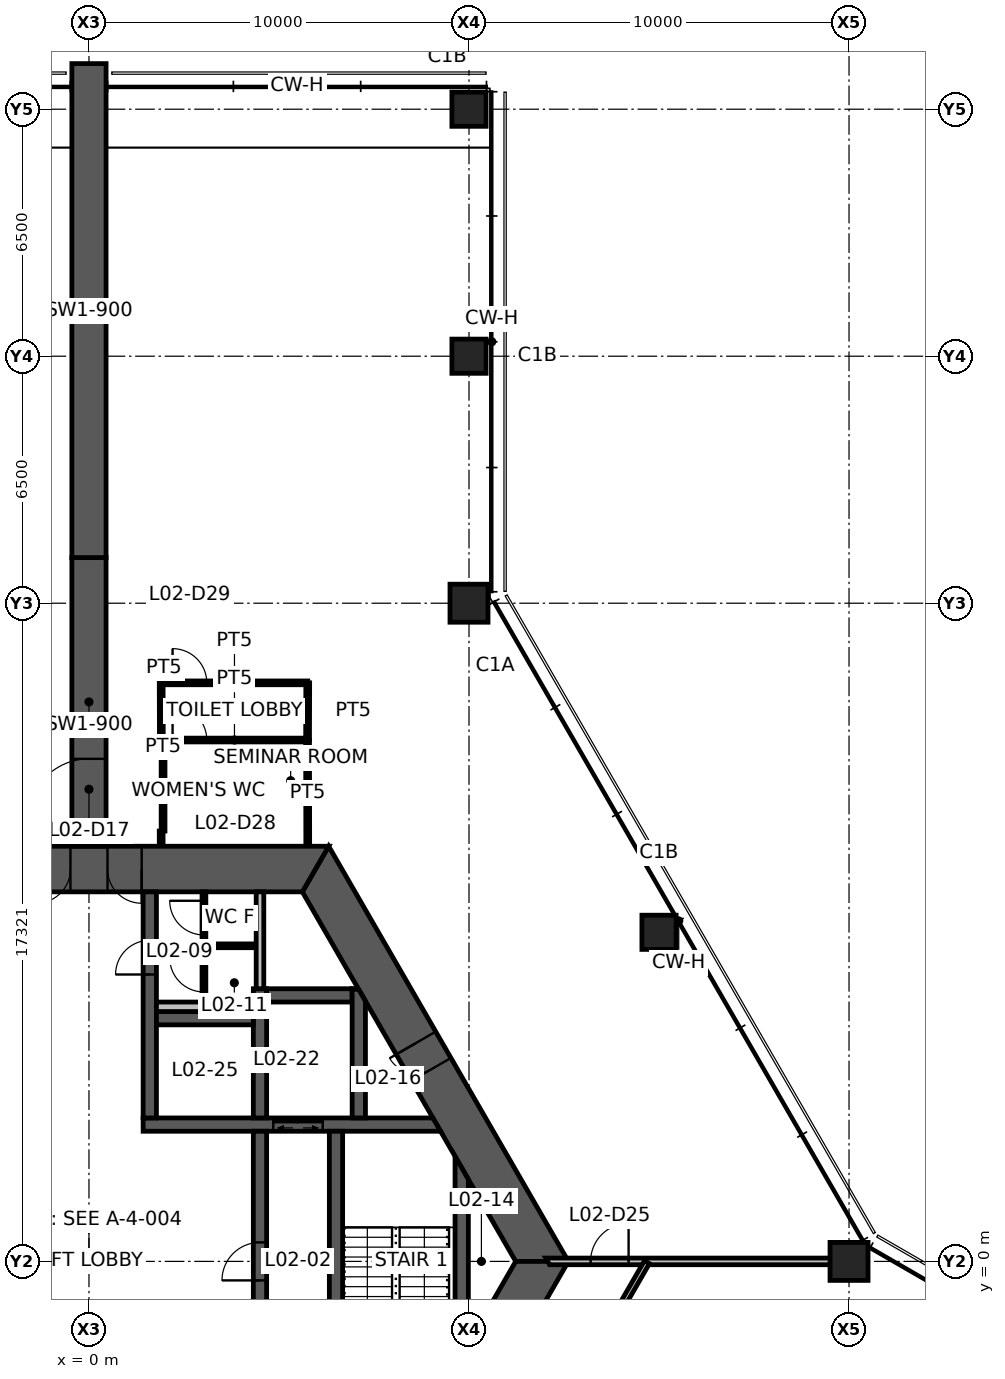
"""IFC4 building model, lengths in metres.
Left out: names, types, materials, properties, quantities, classifications, styles, units other than length and angle.
Written with IfcOpenShell. Run it as: python <this file> out.ifc"""

import sys

from ifc_helpers import new_model, si_unit, direction, frame, frame_2d, origin, origin_2d, place, context, subcontext, project, spatial, polyline, rectangle, hollow_rectangle, outline, extrude, element, fill, save


model = new_model("IFC4")
c1 = context("Model", 3, precision=1e-05, world=origin(), true_north=direction((0.0, 1.0)))
c2 = subcontext(c1, "Body", "Model", "MODEL_VIEW")
j1 = project(units=[si_unit("LENGTHUNIT", "METRE"), si_unit("PLANEANGLEUNIT", "RADIAN")], contexts=[c1])
p1 = place(None, origin())
s1 = spatial("IfcSite", under=j1, at=p1, CompositionType="ELEMENT")
p2 = place(p1, origin())
s2 = spatial("IfcBuilding", under=s1, at=p2, CompositionType="ELEMENT")
p3 = place(p2, frame((0.0, 0.0, 5.5)))
s3 = spatial("IfcBuildingStorey", under=s2, at=p3, CompositionType="ELEMENT", Elevation=5.5)
for number, where, z_axis, x_axis in (
    (1, (20.0, 0.0, 0.0), (0.0, 0.0, 1.0), (1.0, 0.0, 0.0)),
    (2, (10.0, 17.321, 0.0), (0.0, 0.0, 1.0), (1.0, 0.0, 0.0)),
):
    element("IfcColumn", number, at=place(p3, frame(where, z_axis=z_axis, x_axis=x_axis)), inside=s3, PredefinedType="COLUMN", context=c2, shape_type="SweptSolid", body=[
        extrude(hollow_rectangle(XDim=1.0, YDim=1.0, WallThickness=0.06, at=origin_2d()), origin(), (0.0, 0.0, 1.0), 4.5),
    ])
for number, where, z_axis, x_axis in (
    (3, (15.0, 8.66, 0.0), (0.0, 0.0, 1.0), (1.0, 0.0, 0.0)),
    (4, (10.0, 23.821, 0.0), (0.0, 0.0, 1.0), (1.0, 0.0, 0.0)),
    (5, (10.0, 30.321, 0.0), (0.0, 0.0, 1.0), (1.0, 0.0, 0.0)),
):
    element("IfcColumn", number, at=place(p3, frame(where, z_axis=z_axis, x_axis=x_axis)), inside=s3, PredefinedType="COLUMN", context=c2, shape_type="SweptSolid", body=[
        extrude(hollow_rectangle(XDim=0.9, YDim=0.9, WallThickness=0.05, at=origin_2d()), origin(), (0.0, 0.0, 1.0), 4.5),
    ])
p4 = place(p3, frame((11.922, 0.0, 0.0), z_axis=(0.0, 0.0, 1.0), x_axis=(-0.500004296715, 0.866022923061, 0.0)))
e6 = element("IfcWall", 6, at=p4, inside=s3, PredefinedType="SHEAR", context=c2, shape_type="SweptSolid", body=[
    extrude(outline(polyline([(-0.346, -0.6), (5.835, -0.6), (6.635, -0.6), (12.269, -0.6), (11.576, 0.6), (6.635, 0.6), (5.835, 0.6), (0.346, 0.6), (-0.346, -0.6)])), origin(), (0.0, 0.0, 1.0), 4.5),
])
p5 = place(p4, frame((5.835, 0.0, 0.0)))
e7 = element("IfcOpeningElement", 7, at=p5, cuts=e6, PredefinedType="OPENING", context=c2, shape_type="SweptSolid", body=[
    extrude(rectangle(XDim=0.8, YDim=2.1, at=frame_2d((0.4, 1.05))), frame((0.0, 0.61, 0.0), z_axis=(0.0, -1.0, 0.0), x_axis=(1.0, 0.0, 0.0)), (0.0, 0.0, 1.0), 1.22),
])
p6 = place(p3, frame((5.961, 10.325, 0.0), z_axis=(0.0, 0.0, 1.0), x_axis=(-1.0, 0.0, 0.0)))
e8 = element("IfcWall", 8, at=p6, inside=s3, PredefinedType="SHEAR", context=c2, shape_type="SweptSolid", body=[
    extrude(outline(polyline([(-0.346, -0.6), (4.574, -0.6), (5.474, -0.6), (6.449, -0.6), (7.349, -0.6), (12.269, -0.6), (11.576, 0.6), (7.349, 0.6), (6.449, 0.6), (5.474, 0.6), (4.574, 0.6), (0.346, 0.6), (-0.346, -0.6)])), origin(), (0.0, 0.0, 1.0), 4.5),
])
p7 = place(p6, frame((6.449, 0.0, 0.0)))
e9 = element("IfcOpeningElement", 9, at=p7, cuts=e8, PredefinedType="OPENING", context=c2, shape_type="SweptSolid", body=[
    extrude(rectangle(XDim=0.9, YDim=2.1, at=frame_2d((0.45, 1.05))), frame((0.0, 0.61, 0.0), z_axis=(0.0, -1.0, 0.0), x_axis=(1.0, 0.0, 0.0)), (0.0, 0.0, 1.0), 1.22),
])
p8 = place(p6, frame((4.574, 0.0, 0.0)))
e10 = element("IfcOpeningElement", 10, at=p8, cuts=e8, PredefinedType="OPENING", context=c2, shape_type="SweptSolid", body=[
    extrude(rectangle(XDim=0.9, YDim=2.1, at=frame_2d((0.45, 1.05))), frame((0.0, 0.61, 0.0), z_axis=(0.0, -1.0, 0.0), x_axis=(1.0, 0.0, 0.0)), (0.0, 0.0, 1.0), 1.22),
])
p9 = place(p3, frame((5.961, -10.325, 0.0), z_axis=(0.0, 0.0, 1.0), x_axis=(0.500004296715, 0.866022923061, 0.0)))
e11 = element("IfcWall", 11, at=p9, inside=s3, PredefinedType="SHEAR", context=c2, shape_type="SweptSolid", body=[
    extrude(outline(polyline([(-0.346, -0.6), (3.208, -0.6), (4.009, -0.6), (12.269, -0.6), (11.576, 0.6), (4.009, 0.6), (3.208, 0.6), (0.346, 0.6), (-0.346, -0.6)])), origin(), (0.0, 0.0, 1.0), 4.5),
])
p10 = place(p9, frame((3.208, 0.0, 0.0)))
e12 = element("IfcOpeningElement", 12, at=p10, cuts=e11, PredefinedType="OPENING", context=c2, shape_type="SweptSolid", body=[
    extrude(rectangle(XDim=0.8, YDim=2.1, at=frame_2d((0.4, 1.05))), frame((0.0, 0.61, 0.0), z_axis=(0.0, -1.0, 0.0), x_axis=(1.0, 0.0, 0.0)), (0.0, 0.0, 1.0), 1.22),
])
p11 = place(p3, frame((0.0, 10.925, 0.0), z_axis=(0.0, 0.0, 1.0), x_axis=(0.0, 1.0, 0.0)))
e13 = element("IfcWall", 13, at=p11, inside=s3, PredefinedType="SHEAR", context=c2, shape_type="SweptSolid", body=[
    extrude(rectangle(XDim=7.595, YDim=0.9, at=frame_2d((3.798, 0.0))), origin(), (0.0, 0.0, 1.0), 4.5),
])
p12 = place(p11, frame((0.7, 0.0, 0.0)))
e14 = element("IfcOpeningElement", 14, at=p12, cuts=e13, PredefinedType="OPENING", context=c2, shape_type="SweptSolid", body=[
    extrude(rectangle(XDim=1.6, YDim=2.1, at=frame_2d((0.8, 1.05))), frame((0.0, 0.46, 0.0), z_axis=(0.0, -1.0, 0.0), x_axis=(1.0, 0.0, 0.0)), (0.0, 0.0, 1.0), 0.92),
])
p13 = place(p3, frame((0.0, 18.521, 0.0), z_axis=(0.0, 0.0, 1.0), x_axis=(0.0, 1.0, 0.0)))
e15 = element("IfcWall", 15, at=p13, inside=s3, PredefinedType="SHEAR", context=c2, shape_type="SweptSolid", body=[
    extrude(rectangle(XDim=13.0, YDim=0.9, at=frame_2d((6.5, 0.0))), origin(), (0.0, 0.0, 1.0), 4.5),
])
p14 = place(p3, frame((1.425, 3.6, 0.0), z_axis=(0.0, 0.0, 1.0), x_axis=(1.0, 0.0, 0.0)))
e16 = element("IfcWall", 16, at=p14, inside=s3, PredefinedType="SHEAR", context=c2, shape_type="SweptSolid", body=[
    extrude(outline(polyline([(0.0, -0.175), (3.425, -0.175), (4.725, -0.175), (7.827, -0.175), (7.625, 0.175), (4.725, 0.175), (3.425, 0.175), (0.0, 0.175), (0.0, -0.175)])), origin(), (0.0, 0.0, 1.0), 4.5),
])
p15 = place(p14, frame((3.425, 0.0, 0.0)))
e17 = element("IfcOpeningElement", 17, at=p15, cuts=e16, PredefinedType="OPENING", context=c2, shape_type="SweptSolid", body=[
    extrude(rectangle(XDim=1.3, YDim=2.1, at=frame_2d((0.65, 1.05))), frame((0.0, 0.185, 0.0), z_axis=(0.0, -1.0, 0.0), x_axis=(1.0, 0.0, 0.0)), (0.0, 0.0, 1.0), 0.37),
])
p16 = place(p3, frame((1.6, 3.775, 0.0), z_axis=(0.0, 0.0, 1.0), x_axis=(0.0, 1.0, 0.0)))
e18 = element("IfcWall", 18, at=p16, inside=s3, PredefinedType="SHEAR", context=c2, shape_type="SweptSolid", body=[
    extrude(rectangle(XDim=5.95, YDim=0.35, at=frame_2d((2.975, 0.0))), origin(), (0.0, 0.0, 1.0), 4.5),
])
p17 = place(p16, frame((3.775, 0.0, 0.0)))
e19 = element("IfcOpeningElement", 19, at=p17, cuts=e18, PredefinedType="OPENING", context=c2, shape_type="SweptSolid", body=[
    extrude(rectangle(XDim=0.9, YDim=2.1, at=frame_2d((0.45, 1.05))), frame((0.0, 0.185, 0.0), z_axis=(0.0, -1.0, 0.0), x_axis=(1.0, 0.0, 0.0)), (0.0, 0.0, 1.0), 0.37),
])
p18 = place(p3, frame((4.5, -3.425, 0.0), z_axis=(0.0, 0.0, 1.0), x_axis=(0.0, 1.0, 0.0)))
e20 = element("IfcWall", 20, at=p18, inside=s3, PredefinedType="SHEAR", context=c2, shape_type="SweptSolid", body=[
    extrude(rectangle(XDim=6.85, YDim=0.35, at=frame_2d((3.425, 0.0))), origin(), (0.0, 0.0, 1.0), 4.5),
])
p19 = place(p18, frame((2.925, 0.0, 0.0)))
e21 = element("IfcOpeningElement", 21, at=p19, cuts=e20, PredefinedType="OPENING", context=c2, shape_type="SweptSolid", body=[
    extrude(rectangle(XDim=1.0, YDim=2.1, at=frame_2d((0.5, 1.05))), frame((0.0, 0.185, 0.0), z_axis=(0.0, -1.0, 0.0), x_axis=(1.0, 0.0, 0.0)), (0.0, 0.0, 1.0), 0.37),
])
p20 = place(p3, frame((6.5, -3.425, 0.0), z_axis=(0.0, 0.0, 1.0), x_axis=(0.0, 1.0, 0.0)))
e22 = element("IfcWall", 22, at=p20, inside=s3, PredefinedType="SHEAR", context=c2, shape_type="SweptSolid", body=[
    extrude(rectangle(XDim=6.85, YDim=0.35, at=frame_2d((3.425, 0.0))), origin(), (0.0, 0.0, 1.0), 4.5),
])
p21 = place(p20, frame((0.1, 0.0, 0.0)))
e23 = element("IfcOpeningElement", 23, at=p21, cuts=e22, PredefinedType="OPENING", context=c2, shape_type="SweptSolid", body=[
    extrude(rectangle(XDim=1.0, YDim=2.1, at=frame_2d((0.5, 1.05))), frame((0.0, 0.185, 0.0), z_axis=(0.0, -1.0, 0.0), x_axis=(1.0, 0.0, 0.0)), (0.0, 0.0, 1.0), 0.37),
])
p22 = place(p3, frame((4.5, 3.775, 0.0), z_axis=(0.0, 0.0, 1.0), x_axis=(0.0, 1.0, 0.0)))
e24 = element("IfcWall", 24, at=p22, inside=s3, PredefinedType="SHEAR", context=c2, shape_type="SweptSolid", body=[
    extrude(rectangle(XDim=3.4, YDim=0.35, at=frame_2d((1.7, 0.0))), origin(), (0.0, 0.0, 1.0), 4.5),
])
p23 = place(p3, frame((1.775, 6.4, 0.0), z_axis=(0.0, 0.0, 1.0), x_axis=(1.0, 0.0, 0.0)))
e25 = element("IfcWall", 25, at=p23, inside=s3, PredefinedType="SHEAR", context=c2, shape_type="SweptSolid", body=[
    extrude(rectangle(XDim=2.55, YDim=0.35, at=frame_2d((1.275, 0.0))), origin(), (0.0, 0.0, 1.0), 4.5),
])
p24 = place(p3, frame((4.675, 7.0, 0.0), z_axis=(0.0, 0.0, 1.0), x_axis=(1.0, 0.0, 0.0)))
e26 = element("IfcWall", 26, at=p24, inside=s3, PredefinedType="SHEAR", context=c2, shape_type="SweptSolid", body=[
    extrude(rectangle(XDim=2.25, YDim=0.35, at=frame_2d((1.125, 0.0))), origin(), (0.0, 0.0, 1.0), 4.5),
])
p25 = place(p3, frame((7.1, 3.775, 0.0), z_axis=(0.0, 0.0, 1.0), x_axis=(0.0, 1.0, 0.0)))
e27 = element("IfcWall", 27, at=p25, inside=s3, PredefinedType="SHEAR", context=c2, shape_type="SweptSolid", body=[
    extrude(outline(polyline([(0.0, -0.175), (3.074, -0.175), (3.377, 0.0), (3.4, 0.175), (0.0, 0.175), (0.0, -0.175)])), origin(), (0.0, 0.0, 1.0), 4.5),
])
p26 = place(p3, frame((9.808, -2.462, 0.0), z_axis=(0.0, 0.0, 1.0), x_axis=(0.0, 1.0, 0.0)))
e28 = element("IfcWall", 28, at=p26, inside=s3, PredefinedType="SHEAR", context=c2, shape_type="SweptSolid", body=[
    extrude(outline(polyline([(0.303, -0.175), (4.621, -0.175), (5.228, 0.175), (-0.303, 0.175), (0.303, -0.175)])), origin(), (0.0, 0.0, 1.0), 4.5),
])
p27 = place(p3, frame((4.5, 7.175, 0.0), z_axis=(0.0, 0.0, 1.0), x_axis=(0.0, 1.0, 0.0)))
e29 = element("IfcWall", 29, at=p27, inside=s3, PredefinedType="STANDARD", context=c2, shape_type="SweptSolid", body=[
    extrude(rectangle(XDim=2.55, YDim=0.2, at=frame_2d((1.275, 0.0))), origin(), (0.0, 0.0, 1.0), 4.5),
])
p28 = place(p3, frame((1.775, 6.7, 0.0), z_axis=(0.0, 0.0, 1.0), x_axis=(1.0, 0.0, 0.0)))
e30 = element("IfcWall", 30, at=p28, inside=s3, PredefinedType="PLUMBINGWALL", context=c2, shape_type="SweptSolid", body=[
    extrude(rectangle(XDim=2.55, YDim=0.25, at=frame_2d((1.275, 0.0))), origin(), (0.0, 0.0, 1.0), 4.5),
])
p29 = place(p3, frame((3.025, 6.575, 0.0), z_axis=(0.0, 0.0, 1.0), x_axis=(0.0, 1.0, 0.0)))
e31 = element("IfcWall", 31, at=p29, inside=s3, PredefinedType="PARTITIONING", context=c2, shape_type="SweptSolid", body=[
    extrude(rectangle(XDim=3.15, YDim=0.1, at=frame_2d((1.575, 0.0))), origin(), (0.0, 0.0, 1.0), 3.5),
])
p30 = place(p29, frame((2.015, 0.0, 0.0)))
e32 = element("IfcOpeningElement", 32, at=p30, cuts=e31, PredefinedType="OPENING", context=c2, shape_type="SweptSolid", body=[
    extrude(rectangle(XDim=0.9, YDim=2.1, at=frame_2d((0.45, 1.05))), frame((0.0, 0.06, 0.0), z_axis=(0.0, -1.0, 0.0), x_axis=(1.0, 0.0, 0.0)), (0.0, 0.0, 1.0), 0.12),
])
p31 = place(p29, frame((0.515, 0.0, 0.0)))
e33 = element("IfcOpeningElement", 33, at=p31, cuts=e31, PredefinedType="OPENING", context=c2, shape_type="SweptSolid", body=[
    extrude(rectangle(XDim=0.9, YDim=2.1, at=frame_2d((0.45, 1.05))), frame((0.0, 0.06, 0.0), z_axis=(0.0, -1.0, 0.0), x_axis=(1.0, 0.0, 0.0)), (0.0, 0.0, 1.0), 0.12),
])
p32 = place(p3, frame((3.075, 8.305, 0.0), z_axis=(0.0, 0.0, 1.0), x_axis=(1.0, 0.0, 0.0)))
e34 = element("IfcWall", 34, at=p32, inside=s3, PredefinedType="PARTITIONING", context=c2, shape_type="SweptSolid", body=[
    extrude(rectangle(XDim=1.25, YDim=0.1, at=frame_2d((0.625, 0.0))), origin(), (0.0, 0.0, 1.0), 3.5),
])
p33 = place(p3, frame((12.07, 0.0, 0.0), z_axis=(0.0, 0.0, 1.0), x_axis=(1.0, 0.0, 0.0)))
e35 = element("IfcWall", 35, at=p33, inside=s3, PredefinedType="PARTITIONING", context=c2, shape_type="SweptSolid", body=[
    extrude(outline(polyline([(0.051, -0.087), (1.129, -0.087), (2.129, -0.087), (7.93, -0.087), (7.93, 0.087), (2.129, 0.087), (1.129, 0.087), (-0.051, 0.087), (0.051, -0.087)])), origin(), (0.0, 0.0, 1.0), 3.6),
])
p34 = place(p33, frame((1.129, 0.0, 0.0)))
e36 = element("IfcOpeningElement", 36, at=p34, cuts=e35, PredefinedType="OPENING", context=c2, shape_type="SweptSolid", body=[
    extrude(rectangle(XDim=1.0, YDim=2.1, at=frame_2d((0.5, 1.05))), frame((0.0, 0.098, 0.0), z_axis=(0.0, -1.0, 0.0), x_axis=(1.0, 0.0, 0.0)), (0.0, 0.0, 1.0), 0.195),
])
p35 = place(p3, frame((1.9, 13.72, 0.0), z_axis=(0.0, 0.0, 1.0), x_axis=(1.0, 0.0, 0.0)))
e37 = element("IfcWall", 37, at=p35, inside=s3, PredefinedType="PARTITIONING", context=c2, shape_type="SweptSolid", body=[
    extrude(rectangle(XDim=3.857, YDim=0.1, at=frame_2d((1.929, 0.0))), origin(), (0.0, 0.0, 1.0), 3.5),
])
p36 = place(p35, frame((0.3, 0.0, 0.0)))
e38 = element("IfcOpeningElement", 38, at=p36, cuts=e37, PredefinedType="OPENING", context=c2, shape_type="SweptSolid", body=[
    extrude(rectangle(XDim=0.9, YDim=2.1, at=frame_2d((0.45, 1.05))), frame((0.0, 0.06, 0.0), z_axis=(0.0, -1.0, 0.0), x_axis=(1.0, 0.0, 0.0)), (0.0, 0.0, 1.0), 0.12),
])
p37 = place(p3, frame((1.9, 10.945, 0.0), z_axis=(0.0, 0.0, 1.0), x_axis=(0.0, 1.0, 0.0)))
e39 = element("IfcWall", 39, at=p37, inside=s3, PredefinedType="PARTITIONING", context=c2, shape_type="SweptSolid", body=[
    extrude(rectangle(XDim=0.38, YDim=0.1, at=frame_2d((0.19, 0.0))), origin(), (0.0, 0.0, 1.0), 3.5),
])
p38 = place(p3, frame((1.95, 11.325, 0.0), z_axis=(0.0, 0.0, 1.0), x_axis=(0.0, 1.0, 0.0)))
e40 = element("IfcWall", 40, at=p38, inside=s3, PredefinedType="PARTITIONING", context=c2, shape_type="SweptSolid", body=[
    extrude(rectangle(XDim=2.2, YDim=0.1, at=frame_2d((1.1, 0.0))), origin(), (0.0, 0.0, 1.0), 3.5),
])
p39 = place(p3, frame((5.752, 13.725, 0.0), z_axis=(0.0, 0.0, 1.0), x_axis=(0.001756386155, -0.999998457553, 0.0)))
e41 = element("IfcWall", 41, at=p39, inside=s3, PredefinedType="PARTITIONING", context=c2, shape_type="SweptSolid", body=[
    extrude(rectangle(XDim=2.78, YDim=0.1, at=frame_2d((1.39, 0.0))), origin(), (0.0, 0.0, 1.0), 3.5),
])
p40 = place(p3, frame((1.9, 15.225, 0.0), z_axis=(0.0, 0.0, 1.0), x_axis=(1.0, 0.0, 0.0)))
e42 = element("IfcWall", 42, at=p40, inside=s3, PredefinedType="PARTITIONING", context=c2, shape_type="SweptSolid", body=[
    extrude(rectangle(XDim=3.857, YDim=0.1, at=frame_2d((1.929, 0.0))), origin(), (0.0, 0.0, 1.0), 3.5),
])
p41 = place(p40, frame((0.3, 0.0, 0.0)))
e43 = element("IfcOpeningElement", 43, at=p41, cuts=e42, PredefinedType="OPENING", context=c2, shape_type="SweptSolid", body=[
    extrude(rectangle(XDim=0.9, YDim=2.1, at=frame_2d((0.45, 1.05))), frame((0.0, 0.06, 0.0), z_axis=(0.0, -1.0, 0.0), x_axis=(1.0, 0.0, 0.0)), (0.0, 0.0, 1.0), 0.12),
])
for number, where, z_axis, x_axis in (
    (44, (1.905, 13.725, 0.0), (0.0, 0.0, 1.0), (-0.003, 1.0, 0.0)),
    (45, (5.757, 15.225, 0.0), (0.0, 0.0, 1.0), (-0.003, -1.0, 0.0)),
):
    element("IfcWall", number, at=place(p3, frame(where, z_axis=z_axis, x_axis=x_axis)), inside=s3, PredefinedType="PARTITIONING", context=c2, shape_type="SweptSolid", body=[
        extrude(rectangle(XDim=1.5, YDim=0.1, at=frame_2d((0.75, 0.0))), origin(), (0.0, 0.0, 1.0), 3.5),
    ])
p42 = place(p3, frame((14.682, -0.02, 0.0), z_axis=(0.0, 0.0, 1.0), x_axis=(-0.499985579985, -0.866033729024, 0.0)))
e46 = element("IfcWall", 46, at=p42, inside=s3, PredefinedType="PARTITIONING", context=c2, shape_type="SweptSolid", body=[
    extrude(rectangle(XDim=6.854, YDim=0.15, at=frame_2d((3.427, 0.0))), origin(), (0.0, 0.0, 1.0), 3.5),
])
p43 = place(p42, frame((2.927, 0.0, 0.0)))
e47 = element("IfcOpeningElement", 47, at=p43, cuts=e46, PredefinedType="OPENING", context=c2, shape_type="SweptSolid", body=[
    extrude(rectangle(XDim=1.0, YDim=2.1, at=frame_2d((0.5, 1.05))), frame((0.0, 0.085, 0.0), z_axis=(0.0, -1.0, 0.0), x_axis=(1.0, 0.0, 0.0)), (0.0, 0.0, 1.0), 0.17),
])
p44 = place(p7, origin())
e48 = element("IfcDoor", 48, at=p44, inside=s3, OperationType="SINGLE_SWING_RIGHT", PredefinedType="DOOR", context=c2, shape_type="SweptSolid", body=[
    extrude(rectangle(XDim=0.9, YDim=2.1, at=frame_2d((0.45, 1.05))), frame((0.0, 0.025, 0.0), z_axis=(0.0, -1.0, 0.0), x_axis=(1.0, 0.0, 0.0)), (0.0, 0.0, 1.0), 0.05),
])
fill(e9, e48)
p45 = place(p8, origin())
e49 = element("IfcDoor", 49, at=p45, inside=s3, OperationType="SINGLE_SWING_LEFT", PredefinedType="DOOR", context=c2, shape_type="SweptSolid", body=[
    extrude(rectangle(XDim=0.9, YDim=2.1, at=frame_2d((0.45, 1.05))), frame((0.0, 0.025, 0.0), z_axis=(0.0, -1.0, 0.0), x_axis=(1.0, 0.0, 0.0)), (0.0, 0.0, 1.0), 0.05),
])
fill(e10, e49)
p46 = place(p5, origin())
e50 = element("IfcDoor", 50, at=p46, inside=s3, OperationType="SINGLE_SWING_RIGHT", PredefinedType="DOOR", context=c2, shape_type="SweptSolid", body=[
    extrude(rectangle(XDim=0.8, YDim=2.1, at=frame_2d((0.4, 1.05))), frame((0.0, 0.025, 0.0), z_axis=(0.0, -1.0, 0.0), x_axis=(1.0, 0.0, 0.0)), (0.0, 0.0, 1.0), 0.05),
])
fill(e7, e50)
p47 = place(p19, origin())
e51 = element("IfcDoor", 51, at=p47, inside=s3, OperationType="SINGLE_SWING_LEFT", PredefinedType="DOOR", context=c2, shape_type="SweptSolid", body=[
    extrude(rectangle(XDim=1.0, YDim=2.1, at=frame_2d((0.5, 1.05))), frame((0.0, 0.025, 0.0), z_axis=(0.0, -1.0, 0.0), x_axis=(1.0, 0.0, 0.0)), (0.0, 0.0, 1.0), 0.05),
])
fill(e21, e51)
p48 = place(p17, origin())
e52 = element("IfcDoor", 52, at=p48, inside=s3, OperationType="SINGLE_SWING_LEFT", PredefinedType="DOOR", context=c2, shape_type="SweptSolid", body=[
    extrude(rectangle(XDim=0.9, YDim=2.1, at=frame_2d((0.45, 1.05))), frame((0.0, 0.025, 0.0), z_axis=(0.0, -1.0, 0.0), x_axis=(1.0, 0.0, 0.0)), (0.0, 0.0, 1.0), 0.05),
])
fill(e19, e52)
p49 = place(p12, origin())
e53 = element("IfcDoor", 53, at=p49, inside=s3, OperationType="DOUBLE_DOOR_SINGLE_SWING", PredefinedType="DOOR", context=c2, shape_type="SweptSolid", body=[
    extrude(rectangle(XDim=1.6, YDim=2.1, at=frame_2d((0.8, 1.05))), frame((0.0, 0.025, 0.0), z_axis=(0.0, -1.0, 0.0), x_axis=(1.0, 0.0, 0.0)), (0.0, 0.0, 1.0), 0.05),
])
fill(e14, e53)
p50 = place(p30, origin())
e54 = element("IfcDoor", 54, at=p50, inside=s3, OperationType="SINGLE_SWING_RIGHT", PredefinedType="DOOR", context=c2, shape_type="SweptSolid", body=[
    extrude(rectangle(XDim=0.9, YDim=2.1, at=frame_2d((0.45, 1.05))), frame((0.0, 0.025, 0.0), z_axis=(0.0, -1.0, 0.0), x_axis=(1.0, 0.0, 0.0)), (0.0, 0.0, 1.0), 0.05),
])
fill(e32, e54)
p51 = place(p31, origin())
e55 = element("IfcDoor", 55, at=p51, inside=s3, OperationType="SINGLE_SWING_RIGHT", PredefinedType="DOOR", context=c2, shape_type="SweptSolid", body=[
    extrude(rectangle(XDim=0.9, YDim=2.1, at=frame_2d((0.45, 1.05))), frame((0.0, 0.025, 0.0), z_axis=(0.0, -1.0, 0.0), x_axis=(1.0, 0.0, 0.0)), (0.0, 0.0, 1.0), 0.05),
])
fill(e33, e55)
p52 = place(p34, origin())
e56 = element("IfcDoor", 56, at=p52, inside=s3, OperationType="SINGLE_SWING_RIGHT", PredefinedType="DOOR", context=c2, shape_type="SweptSolid", body=[
    extrude(rectangle(XDim=1.0, YDim=2.1, at=frame_2d((0.5, 1.05))), frame((0.0, 0.025, 0.0), z_axis=(0.0, -1.0, 0.0), x_axis=(1.0, 0.0, 0.0)), (0.0, 0.0, 1.0), 0.05),
])
fill(e36, e56)
p53 = place(p36, origin())
e57 = element("IfcDoor", 57, at=p53, inside=s3, OperationType="SINGLE_SWING_LEFT", PredefinedType="DOOR", context=c2, shape_type="SweptSolid", body=[
    extrude(rectangle(XDim=0.9, YDim=2.1, at=frame_2d((0.45, 1.05))), frame((0.0, 0.025, 0.0), z_axis=(0.0, -1.0, 0.0), x_axis=(1.0, 0.0, 0.0)), (0.0, 0.0, 1.0), 0.05),
])
fill(e38, e57)
p54 = place(p41, origin())
e58 = element("IfcDoor", 58, at=p54, inside=s3, OperationType="SINGLE_SWING_LEFT", PredefinedType="DOOR", context=c2, shape_type="SweptSolid", body=[
    extrude(rectangle(XDim=0.9, YDim=2.1, at=frame_2d((0.45, 1.05))), frame((0.0, 0.025, 0.0), z_axis=(0.0, -1.0, 0.0), x_axis=(1.0, 0.0, 0.0)), (0.0, 0.0, 1.0), 0.05),
])
fill(e43, e58)
p55 = place(p15, origin())
e59 = element("IfcDoor", 59, at=p55, inside=s3, OperationType="DOUBLE_DOOR_SLIDING", PredefinedType="DOOR", context=c2, shape_type="SweptSolid", body=[
    extrude(rectangle(XDim=1.3, YDim=2.1, at=frame_2d((0.65, 1.05))), frame((0.0, 0.025, 0.0), z_axis=(0.0, -1.0, 0.0), x_axis=(1.0, 0.0, 0.0)), (0.0, 0.0, 1.0), 0.05),
])
fill(e17, e59)
save(model, sys.argv[1])
